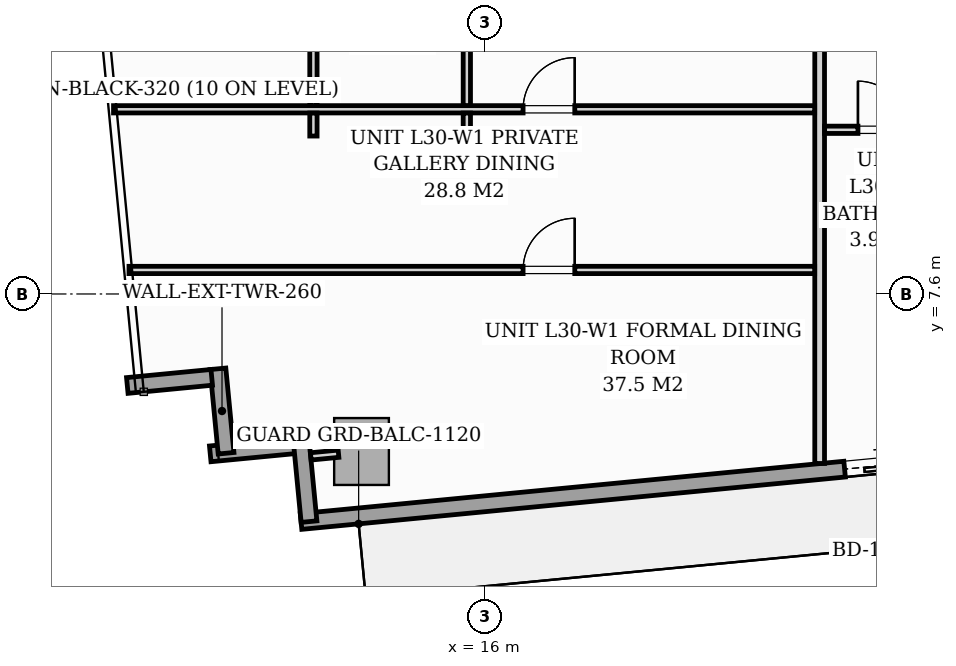
"""IFC4 building model, lengths in metres.
Left out: names, types, materials, properties, quantities, classifications, styles, units other than length and angle.
Written with IfcOpenShell. Run it as: python <this file> out.ifc"""

import sys

from ifc_helpers import new_model, si_unit, direction, frame, frame_2d, origin, origin_2d, place, context, subcontext, project, spatial, rectangle, extrude, source, transform, mapped, element, fill, save


model = new_model("IFC4")
c1 = context("Model", 3, precision=1e-05, world=origin(), true_north=direction((0.0, 1.0)))
c2 = subcontext(c1, "Body", "Model", "MODEL_VIEW")
j1 = project(units=[si_unit("LENGTHUNIT", "METRE"), si_unit("PLANEANGLEUNIT", "RADIAN")], contexts=[c1])
p1 = place(None, origin())
s1 = spatial("IfcSite", under=j1, at=p1, CompositionType="ELEMENT")
p2 = place(p1, origin())
s2 = spatial("IfcBuilding", under=s1, at=p2, CompositionType="ELEMENT")
p3 = place(p2, frame((0.0, 0.0, 106.6)))
s3 = spatial("IfcBuildingStorey", under=s2, at=p3, CompositionType="ELEMENT", Elevation=106.6)
m1 = source(origin(), c2, "Body", "SweptSolid", [
    extrude(rectangle(XDim=0.9, YDim=1.1, at=origin_2d()), origin(), (0.0, 0.0, 1.0), 3.196),
])
p4 = place(p3, frame((13.966, 5.01, 0.002), z_axis=(0.0, 0.0, 1.0), x_axis=(0.995396198367, 0.09584575252, 0.0)))
e1 = element("IfcColumn", 1, at=p4, inside=s3, PredefinedType="COLUMN", context=c2, shape_type="MappedRepresentation", body=[
    mapped(m1, transform((0.0, 0.0, 0.0), scale=1.0)),
])
for number, where, z_axis, x_axis in (
    (2, (12.867, 5.104, 0.0), (0.0, 0.0, 1.0), (-0.995, -0.096, 0.0)),
    (3, (11.739, 4.981, 0.0), (0.0, 0.0, 1.0), (-0.096, 0.995, 0.0)),
):
    element("IfcWall", number, at=place(p3, frame(where, z_axis=z_axis, x_axis=x_axis)), inside=s3, PredefinedType="STANDARD", context=c2, shape_type="SweptSolid", body=[
        extrude(rectangle(XDim=1.395, YDim=0.26, at=frame_2d((0.697, 0.0))), origin(), (0.0, 0.0, 1.0), 2.94),
    ])
p5 = place(p3, frame((11.503, 6.229, 0.0), z_axis=(0.0, 0.0, 1.0), x_axis=(-0.995391056452, -0.09589913835, 0.0)))
e4 = element("IfcWall", 4, at=p5, inside=s3, PredefinedType="STANDARD", context=c2, shape_type="SweptSolid", body=[
    extrude(rectangle(XDim=1.395, YDim=0.26, at=frame_2d((0.698, 0.0))), origin(), (0.0, 0.0, 1.0), 2.94),
])
p6 = place(p3, frame((31.994, 5.69, 0.0), z_axis=(0.0, 0.0, 1.0), x_axis=(-0.995396521236, -0.095842399342, 0.0)))
e5 = element("IfcWall", 5, at=p6, inside=s3, PredefinedType="STANDARD", context=c2, shape_type="SweptSolid", body=[
    extrude(rectangle(XDim=19.11, YDim=0.26, at=frame_2d((9.555, 0.0))), origin(), (0.0, 0.0, 1.0), 2.94),
])
p7 = place(p6, frame((8.33, 0.0, 0.0)))
e6 = element("IfcOpeningElement", 6, at=p7, cuts=e5, PredefinedType="OPENING", context=c2, shape_type="SweptSolid", body=[
    extrude(rectangle(XDim=1.8, YDim=2.06, at=frame_2d((0.9, 1.03))), frame((0.0, 0.14, 0.0), z_axis=(0.0, -1.0, 0.0), x_axis=(1.0, 0.0, 0.0)), (0.0, 0.0, 1.0), 0.28),
])
p8 = place(p6, frame((2.05, 0.0, 0.65)))
e7 = element("IfcOpeningElement", 7, at=p8, cuts=e5, PredefinedType="OPENING", context=c2, shape_type="SweptSolid", body=[
    extrude(rectangle(XDim=1.6, YDim=1.5, at=frame_2d((0.8, 0.75))), frame((0.0, 0.14, 0.0), z_axis=(0.0, -1.0, 0.0), x_axis=(1.0, 0.0, 0.0)), (0.0, 0.0, 1.0), 0.28),
])
p9 = place(p3, frame((13.103, 3.856, 0.0), z_axis=(0.0, 0.0, 1.0), x_axis=(-0.09589913835, 0.995391056452, 0.0)))
e8 = element("IfcWall", 8, at=p9, inside=s3, PredefinedType="STANDARD", context=c2, shape_type="SweptSolid", body=[
    extrude(rectangle(XDim=1.395, YDim=0.26, at=frame_2d((0.698, 0.0))), origin(), (0.0, 0.0, 1.0), 2.94),
])
p10 = place(p3, frame((21.5, 4.812, 0.0), z_axis=(0.0, 0.0, 1.0), x_axis=(0.0, 1.0, 0.0)))
e9 = element("IfcWall", 9, at=p10, inside=s3, PredefinedType="PARTITIONING", context=c2, shape_type="SweptSolid", body=[
    extrude(rectangle(XDim=7.656, YDim=0.16, at=frame_2d((3.828, 0.0))), origin(), (0.0, 0.0, 1.0), 2.94),
])
p11 = place(p3, frame((21.582, 10.3, 0.0), z_axis=(0.0, 0.0, 1.0), x_axis=(1.0, 0.0, 0.0)))
e10 = element("IfcWall", 10, at=p11, inside=s3, PredefinedType="PARTITIONING", context=c2, shape_type="SweptSolid", body=[
    extrude(rectangle(XDim=4.098, YDim=0.12, at=frame_2d((2.049, 0.0))), origin(), (0.0, 0.0, 1.0), 2.94),
])
p12 = place(p11, frame((0.548, 0.0, 0.0)))
e11 = element("IfcOpeningElement", 11, at=p12, cuts=e10, PredefinedType="OPENING", context=c2, shape_type="SweptSolid", body=[
    extrude(rectangle(XDim=0.8, YDim=2.02, at=frame_2d((0.4, 1.01))), frame((0.0, 0.07, 0.0), z_axis=(0.0, -1.0, 0.0), x_axis=(1.0, 0.0, 0.0)), (0.0, 0.0, 1.0), 0.14),
])
p13 = place(p11, frame((2.573, 0.0, 0.0)))
e12 = element("IfcOpeningElement", 12, at=p13, cuts=e10, PredefinedType="OPENING", context=c2, shape_type="SweptSolid", body=[
    extrude(rectangle(XDim=0.85, YDim=2.05, at=frame_2d((0.425, 1.025))), frame((0.0, 0.07, 0.0), z_axis=(0.0, -1.0, 0.0), x_axis=(1.0, 0.0, 0.0)), (0.0, 0.0, 1.0), 0.14),
])
p14 = place(p3, frame((10.142, 7.995, 0.0), z_axis=(0.0, 0.0, 1.0), x_axis=(1.0, 0.0, 0.0)))
e13 = element("IfcWall", 13, at=p14, inside=s3, PredefinedType="PARTITIONING", context=c2, shape_type="SweptSolid", body=[
    extrude(rectangle(XDim=11.276, YDim=0.12, at=frame_2d((5.638, 0.0))), origin(), (0.0, 0.0, 1.0), 2.94),
])
p15 = place(p14, frame((6.481, 0.0, 0.0)))
e14 = element("IfcOpeningElement", 14, at=p15, cuts=e13, PredefinedType="OPENING", context=c2, shape_type="SweptSolid", body=[
    extrude(rectangle(XDim=0.85, YDim=2.05, at=frame_2d((0.425, 1.025))), frame((0.0, 0.07, 0.0), z_axis=(0.0, -1.0, 0.0), x_axis=(1.0, 0.0, 0.0)), (0.0, 0.0, 1.0), 0.14),
])
p16 = place(p3, frame((9.888, 10.637, 0.0), z_axis=(0.0, 0.0, 1.0), x_axis=(1.0, 0.0, 0.0)))
e15 = element("IfcWall", 15, at=p16, inside=s3, PredefinedType="PARTITIONING", context=c2, shape_type="SweptSolid", body=[
    extrude(rectangle(XDim=11.53, YDim=0.12, at=frame_2d((5.765, 0.0))), origin(), (0.0, 0.0, 1.0), 2.94),
])
p17 = place(p16, frame((6.735, 0.0, 0.0)))
e16 = element("IfcOpeningElement", 16, at=p17, cuts=e15, PredefinedType="OPENING", context=c2, shape_type="SweptSolid", body=[
    extrude(rectangle(XDim=0.85, YDim=2.05, at=frame_2d((0.425, 1.025))), frame((0.0, 0.07, 0.0), z_axis=(0.0, -1.0, 0.0), x_axis=(1.0, 0.0, 0.0)), (0.0, 0.0, 1.0), 0.14),
])
p18 = place(p3, frame((13.175, 10.197, 0.0), z_axis=(0.0, 0.0, 1.0), x_axis=(0.0, 1.0, 0.0)))
e17 = element("IfcWall", 17, at=p18, inside=s3, PredefinedType="PARTITIONING", context=c2, shape_type="SweptSolid", body=[
    extrude(rectangle(XDim=0.378, YDim=0.12, at=frame_2d((0.189, 0.0))), origin(), (0.0, 0.0, 1.0), 2.94),
])
p19 = place(p3, frame((13.175, 10.699, 0.0), z_axis=(0.0, 0.0, 1.0), x_axis=(0.0, 1.0, 0.0)))
e18 = element("IfcWall", 18, at=p19, inside=s3, PredefinedType="PARTITIONING", context=c2, shape_type="SweptSolid", body=[
    extrude(rectangle(XDim=10.61, YDim=0.12, at=frame_2d((5.305, 0.0))), origin(), (0.0, 0.0, 1.0), 2.94),
])
p20 = place(p19, frame((4.88, 0.0, 0.0)))
e19 = element("IfcOpeningElement", 19, at=p20, cuts=e18, PredefinedType="OPENING", context=c2, shape_type="SweptSolid", body=[
    extrude(rectangle(XDim=0.85, YDim=2.05, at=frame_2d((0.425, 1.025))), frame((0.0, 0.07, 0.0), z_axis=(0.0, -1.0, 0.0), x_axis=(1.0, 0.0, 0.0)), (0.0, 0.0, 1.0), 0.14),
])
p21 = place(p3, frame((15.698, 10.197, 0.0), z_axis=(0.0, 0.0, 1.0), x_axis=(0.0, 1.0, 0.0)))
e20 = element("IfcWall", 20, at=p21, inside=s3, PredefinedType="PARTITIONING", context=c2, shape_type="SweptSolid", body=[
    extrude(rectangle(XDim=0.378, YDim=0.12, at=frame_2d((0.189, 0.0))), origin(), (0.0, 0.0, 1.0), 2.94),
])
p22 = place(p3, frame((15.698, 10.699, 0.0), z_axis=(0.0, 0.0, 1.0), x_axis=(0.0, 1.0, 0.0)))
e21 = element("IfcWall", 21, at=p22, inside=s3, PredefinedType="PARTITIONING", context=c2, shape_type="SweptSolid", body=[
    extrude(rectangle(XDim=10.61, YDim=0.12, at=frame_2d((5.305, 0.0))), origin(), (0.0, 0.0, 1.0), 2.94),
])
p23 = place(p22, frame((4.88, 0.0, 0.0)))
e22 = element("IfcOpeningElement", 22, at=p23, cuts=e21, PredefinedType="OPENING", context=c2, shape_type="SweptSolid", body=[
    extrude(rectangle(XDim=0.85, YDim=2.05, at=frame_2d((0.425, 1.025))), frame((0.0, 0.07, 0.0), z_axis=(0.0, -1.0, 0.0), x_axis=(1.0, 0.0, 0.0)), (0.0, 0.0, 1.0), 0.14),
])
p24 = place(p3, frame((13.588, 4.973, 0.0), z_axis=(0.0, 0.0, 1.0), x_axis=(-0.995435366701, -0.095438098896, 0.0)))
e23 = element("IfcWall", 23, at=p24, inside=s3, PredefinedType="PARTITIONING", context=c2, shape_type="SweptSolid", body=[
    extrude(rectangle(XDim=0.458, YDim=0.12, at=frame_2d((0.229, 0.0))), origin(), (0.0, 0.0, 1.0), 2.94),
])
m2 = source(origin(), c2, "Body", "SweptSolid", [
    extrude(rectangle(XDim=1.8, YDim=2.06, at=frame_2d((0.9, 1.03))), frame((0.0, 0.025, 0.0), z_axis=(0.0, -1.0, 0.0), x_axis=(1.0, 0.0, 0.0)), (0.0, 0.0, 1.0), 0.05),
])
p25 = place(p7, origin())
e24 = element("IfcDoor", 24, at=p25, inside=s3, OperationType="SLIDING_TO_LEFT", PredefinedType="DOOR", context=c2, shape_type="MappedRepresentation", body=[
    mapped(m2, transform((0.0, 0.0, 0.0), scale=1.0)),
])
fill(e6, e24)
m3 = source(origin(), c2, "Body", "SweptSolid", [
    extrude(rectangle(XDim=0.8, YDim=2.02, at=frame_2d((0.4, 1.01))), frame((0.0, 0.025, 0.0), z_axis=(0.0, -1.0, 0.0), x_axis=(1.0, 0.0, 0.0)), (0.0, 0.0, 1.0), 0.05),
])
p26 = place(p12, origin())
e25 = element("IfcDoor", 25, at=p26, inside=s3, OperationType="SINGLE_SWING_LEFT", PredefinedType="DOOR", context=c2, shape_type="MappedRepresentation", body=[
    mapped(m3, transform((0.0, 0.0, 0.0), scale=1.0)),
])
fill(e11, e25)
m4 = source(origin(), c2, "Body", "SweptSolid", [
    extrude(rectangle(XDim=0.85, YDim=2.05, at=frame_2d((0.425, 1.025))), frame((0.0, 0.025, 0.0), z_axis=(0.0, -1.0, 0.0), x_axis=(1.0, 0.0, 0.0)), (0.0, 0.0, 1.0), 0.05),
])
p27 = place(p15, origin())
e26 = element("IfcDoor", 26, at=p27, inside=s3, OperationType="SINGLE_SWING_RIGHT", PredefinedType="DOOR", context=c2, shape_type="MappedRepresentation", body=[
    mapped(m4, transform((0.0, 0.0, 0.0), scale=1.0)),
])
fill(e14, e26)
p28 = place(p17, origin())
e27 = element("IfcDoor", 27, at=p28, inside=s3, OperationType="SINGLE_SWING_RIGHT", PredefinedType="DOOR", context=c2, shape_type="MappedRepresentation", body=[
    mapped(m4, transform((0.0, 0.0, 0.0), scale=1.0)),
])
fill(e16, e27)
save(model, sys.argv[1])
